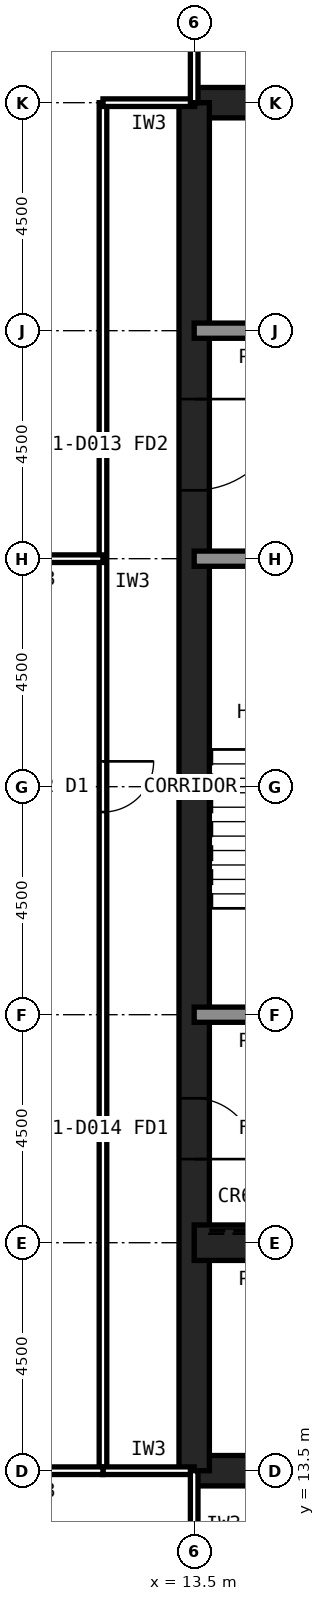
"""IFC4 building model, lengths in metres.
Left out: names, types, materials, properties, quantities, classifications, styles, units other than length and angle.
Written with IfcOpenShell. Run it as: python <this file> out.ifc"""

import sys

from ifc_helpers import new_model, si_unit, direction, frame, frame_2d, origin, place, context, subcontext, project, spatial, rectangle, extrude, element, fill, save


model = new_model("IFC4")
c1 = context("Model", 3, precision=1e-05, world=origin(), true_north=direction((0.0, 1.0)))
c2 = subcontext(c1, "Body", "Model", "MODEL_VIEW")
j1 = project(units=[si_unit("LENGTHUNIT", "METRE"), si_unit("PLANEANGLEUNIT", "RADIAN")], contexts=[c1])
p1 = place(None, origin())
s1 = spatial("IfcSite", under=j1, at=p1, CompositionType="ELEMENT")
p2 = place(p1, origin())
s2 = spatial("IfcBuilding", under=s1, at=p2, CompositionType="ELEMENT")
p3 = place(p2, frame((0.0, 0.0, 87.8)))
s3 = spatial("IfcBuildingStorey", under=s2, at=p3, CompositionType="ELEMENT", Elevation=87.8)
for number, where, z_axis, x_axis in (
    (1, (13.5, 13.5, 0.0), (0.0, 0.0, 1.0), (1.0, 0.0, 0.0)),
    (2, (40.5, 40.5, 0.0), (0.0, 0.0, 1.0), (-1.0, 0.0, 0.0)),
):
    element("IfcWall", number, at=place(p3, frame(where, z_axis=z_axis, x_axis=x_axis)), inside=s3, PredefinedType="SHEAR", context=c2, shape_type="SweptSolid", body=[
        extrude(rectangle(XDim=27.0, YDim=0.6, at=frame_2d((13.5, 0.0))), origin(), (0.0, 0.0, 1.0), 4.2),
    ])
p4 = place(p3, frame((13.5, 40.5, 0.0), z_axis=(0.0, 0.0, 1.0), x_axis=(0.0, -1.0, 0.0)))
e3 = element("IfcWall", 3, at=p4, inside=s3, PredefinedType="SHEAR", context=c2, shape_type="SweptSolid", body=[
    extrude(rectangle(XDim=27.0, YDim=0.6, at=frame_2d((13.5, 0.0))), origin(), (0.0, 0.0, 1.0), 4.2),
])
p5 = place(p4, frame((19.65, 0.0, 0.0)))
e4 = element("IfcOpeningElement", 4, at=p5, cuts=e3, PredefinedType="OPENING", context=c2, shape_type="SweptSolid", body=[
    extrude(rectangle(XDim=1.2, YDim=2.1, at=frame_2d((0.6, 1.05))), frame((0.0, 0.31, 0.0), z_axis=(0.0, -1.0, 0.0), x_axis=(1.0, 0.0, 0.0)), (0.0, 0.0, 1.0), 0.62),
])
p6 = place(p4, frame((5.85, 0.0, 0.0)))
e5 = element("IfcOpeningElement", 5, at=p6, cuts=e3, PredefinedType="OPENING", context=c2, shape_type="SweptSolid", body=[
    extrude(rectangle(XDim=1.8, YDim=2.1, at=frame_2d((0.9, 1.05))), frame((0.0, 0.31, 0.0), z_axis=(0.0, -1.0, 0.0), x_axis=(1.0, 0.0, 0.0)), (0.0, 0.0, 1.0), 0.62),
])
p7 = place(p3, frame((13.5, 18.0, 0.0), z_axis=(0.0, 0.0, 1.0), x_axis=(1.0, 0.0, 0.0)))
e6 = element("IfcWall", 6, at=p7, inside=s3, PredefinedType="SHEAR", context=c2, shape_type="SweptSolid", body=[
    extrude(rectangle(XDim=27.0, YDim=0.7, at=frame_2d((13.5, 0.0))), origin(), (0.0, 0.0, 1.0), 4.2),
])
p8 = place(p7, frame((24.3, 0.0, 0.0)))
e7 = element("IfcOpeningElement", 7, at=p8, cuts=e6, PredefinedType="OPENING", context=c2, shape_type="SweptSolid", body=[
    extrude(rectangle(XDim=0.9, YDim=2.1, at=frame_2d((0.45, 1.05))), frame((0.0, 0.36, 0.0), z_axis=(0.0, -1.0, 0.0), x_axis=(1.0, 0.0, 0.0)), (0.0, 0.0, 1.0), 0.72),
])
p9 = place(p7, frame((5.45, 0.0, 0.0)))
e8 = element("IfcOpeningElement", 8, at=p9, cuts=e6, PredefinedType="OPENING", context=c2, shape_type="SweptSolid", body=[
    extrude(rectangle(XDim=1.1, YDim=2.1, at=frame_2d((0.55, 1.05))), frame((0.0, 0.36, 0.0), z_axis=(0.0, -1.0, 0.0), x_axis=(1.0, 0.0, 0.0)), (0.0, 0.0, 1.0), 0.72),
])
p10 = place(p7, frame((8.45, 0.0, 0.0)))
e9 = element("IfcOpeningElement", 9, at=p10, cuts=e6, PredefinedType="OPENING", context=c2, shape_type="SweptSolid", body=[
    extrude(rectangle(XDim=1.1, YDim=2.1, at=frame_2d((0.55, 1.05))), frame((0.0, 0.36, 0.0), z_axis=(0.0, -1.0, 0.0), x_axis=(1.0, 0.0, 0.0)), (0.0, 0.0, 1.0), 0.72),
])
p11 = place(p7, frame((11.45, 0.0, 0.0)))
e10 = element("IfcOpeningElement", 10, at=p11, cuts=e6, PredefinedType="OPENING", context=c2, shape_type="SweptSolid", body=[
    extrude(rectangle(XDim=1.1, YDim=2.1, at=frame_2d((0.55, 1.05))), frame((0.0, 0.36, 0.0), z_axis=(0.0, -1.0, 0.0), x_axis=(1.0, 0.0, 0.0)), (0.0, 0.0, 1.0), 0.72),
])
p12 = place(p7, frame((14.45, 0.0, 0.0)))
e11 = element("IfcOpeningElement", 11, at=p12, cuts=e6, PredefinedType="OPENING", context=c2, shape_type="SweptSolid", body=[
    extrude(rectangle(XDim=1.1, YDim=2.1, at=frame_2d((0.55, 1.05))), frame((0.0, 0.36, 0.0), z_axis=(0.0, -1.0, 0.0), x_axis=(1.0, 0.0, 0.0)), (0.0, 0.0, 1.0), 0.72),
])
p13 = place(p7, frame((17.45, 0.0, 0.0)))
e12 = element("IfcOpeningElement", 12, at=p13, cuts=e6, PredefinedType="OPENING", context=c2, shape_type="SweptSolid", body=[
    extrude(rectangle(XDim=1.1, YDim=2.1, at=frame_2d((0.55, 1.05))), frame((0.0, 0.36, 0.0), z_axis=(0.0, -1.0, 0.0), x_axis=(1.0, 0.0, 0.0)), (0.0, 0.0, 1.0), 0.72),
])
p14 = place(p7, frame((20.45, 0.0, 0.0)))
e13 = element("IfcOpeningElement", 13, at=p14, cuts=e6, PredefinedType="OPENING", context=c2, shape_type="SweptSolid", body=[
    extrude(rectangle(XDim=1.1, YDim=2.1, at=frame_2d((0.55, 1.05))), frame((0.0, 0.36, 0.0), z_axis=(0.0, -1.0, 0.0), x_axis=(1.0, 0.0, 0.0)), (0.0, 0.0, 1.0), 0.72),
])
p15 = place(p7, frame((1.6, 0.0, 0.0)))
e14 = element("IfcOpeningElement", 14, at=p15, cuts=e6, PredefinedType="OPENING", context=c2, shape_type="SweptSolid", body=[
    extrude(rectangle(XDim=1.3, YDim=2.2, at=frame_2d((0.65, 1.1))), frame((0.0, 0.36, 0.0), z_axis=(0.0, -1.0, 0.0), x_axis=(1.0, 0.0, 0.0)), (0.0, 0.0, 1.0), 0.72),
])
p16 = place(p3, frame((13.5, 36.0, 0.0), z_axis=(0.0, 0.0, 1.0), x_axis=(1.0, 0.0, 0.0)))
e15 = element("IfcWall", 15, at=p16, inside=s3, PredefinedType="SOLIDWALL", context=c2, shape_type="SweptSolid", body=[
    extrude(rectangle(XDim=27.0, YDim=0.3, at=frame_2d((13.5, 0.0))), origin(), (0.0, 0.0, 1.0), 4.04),
])
p17 = place(p16, frame((1.8, 0.0, 0.0)))
e16 = element("IfcOpeningElement", 16, at=p17, cuts=e15, PredefinedType="OPENING", context=c2, shape_type="SweptSolid", body=[
    extrude(rectangle(XDim=0.9, YDim=2.1, at=frame_2d((0.45, 1.05))), frame((0.0, 0.16, 0.0), z_axis=(0.0, -1.0, 0.0), x_axis=(1.0, 0.0, 0.0)), (0.0, 0.0, 1.0), 0.32),
])
p18 = place(p16, frame((24.1, 0.0, 0.0)))
e17 = element("IfcOpeningElement", 17, at=p18, cuts=e15, PredefinedType="OPENING", context=c2, shape_type="SweptSolid", body=[
    extrude(rectangle(XDim=1.3, YDim=2.2, at=frame_2d((0.65, 1.1))), frame((0.0, 0.16, 0.0), z_axis=(0.0, -1.0, 0.0), x_axis=(1.0, 0.0, 0.0)), (0.0, 0.0, 1.0), 0.32),
])
p19 = place(p3, frame((13.5, 22.5, 0.0), z_axis=(0.0, 0.0, 1.0), x_axis=(1.0, 0.0, 0.0)))
e18 = element("IfcWall", 18, at=p19, inside=s3, PredefinedType="SOLIDWALL", context=c2, shape_type="SweptSolid", body=[
    extrude(rectangle(XDim=27.0, YDim=0.3, at=frame_2d((13.5, 0.0))), origin(), (0.0, 0.0, 1.0), 4.04),
])
p20 = place(p19, frame((1.65, 0.0, 0.0)))
e19 = element("IfcOpeningElement", 19, at=p20, cuts=e18, PredefinedType="OPENING", context=c2, shape_type="SweptSolid", body=[
    extrude(rectangle(XDim=1.2, YDim=2.1, at=frame_2d((0.6, 1.05))), frame((0.0, 0.16, 0.0), z_axis=(0.0, -1.0, 0.0), x_axis=(1.0, 0.0, 0.0)), (0.0, 0.0, 1.0), 0.32),
])
p21 = place(p19, frame((6.025, 0.0, 0.0)))
e20 = element("IfcOpeningElement", 20, at=p21, cuts=e18, PredefinedType="OPENING", context=c2, shape_type="SweptSolid", body=[
    extrude(rectangle(XDim=1.0, YDim=2.1, at=frame_2d((0.5, 1.05))), frame((0.0, 0.16, 0.0), z_axis=(0.0, -1.0, 0.0), x_axis=(1.0, 0.0, 0.0)), (0.0, 0.0, 1.0), 0.32),
])
p22 = place(p19, frame((10.525, 0.0, 0.0)))
e21 = element("IfcOpeningElement", 21, at=p22, cuts=e18, PredefinedType="OPENING", context=c2, shape_type="SweptSolid", body=[
    extrude(rectangle(XDim=1.0, YDim=2.1, at=frame_2d((0.5, 1.05))), frame((0.0, 0.16, 0.0), z_axis=(0.0, -1.0, 0.0), x_axis=(1.0, 0.0, 0.0)), (0.0, 0.0, 1.0), 0.32),
])
p23 = place(p19, frame((19.75, 0.0, 0.0)))
e22 = element("IfcOpeningElement", 22, at=p23, cuts=e18, PredefinedType="OPENING", context=c2, shape_type="SweptSolid", body=[
    extrude(rectangle(XDim=1.0, YDim=2.1, at=frame_2d((0.5, 1.05))), frame((0.0, 0.16, 0.0), z_axis=(0.0, -1.0, 0.0), x_axis=(1.0, 0.0, 0.0)), (0.0, 0.0, 1.0), 0.32),
])
p24 = place(p19, frame((15.05, 0.0, 0.0)))
e23 = element("IfcOpeningElement", 23, at=p24, cuts=e18, PredefinedType="OPENING", context=c2, shape_type="SweptSolid", body=[
    extrude(rectangle(XDim=1.4, YDim=2.4, at=frame_2d((0.7, 1.2))), frame((0.0, 0.16, 0.0), z_axis=(0.0, -1.0, 0.0), x_axis=(1.0, 0.0, 0.0)), (0.0, 0.0, 1.0), 0.32),
])
p25 = place(p3, frame((13.5, 31.5, 0.0), z_axis=(0.0, 0.0, 1.0), x_axis=(1.0, 0.0, 0.0)))
e24 = element("IfcWall", 24, at=p25, inside=s3, PredefinedType="SOLIDWALL", context=c2, shape_type="SweptSolid", body=[
    extrude(rectangle(XDim=27.0, YDim=0.3, at=frame_2d((13.5, 0.0))), origin(), (0.0, 0.0, 1.0), 4.04),
])
p26 = place(p25, frame((24.15, 0.0, 0.0)))
e25 = element("IfcOpeningElement", 25, at=p26, cuts=e24, PredefinedType="OPENING", context=c2, shape_type="SweptSolid", body=[
    extrude(rectangle(XDim=1.2, YDim=2.1, at=frame_2d((0.6, 1.05))), frame((0.0, 0.16, 0.0), z_axis=(0.0, -1.0, 0.0), x_axis=(1.0, 0.0, 0.0)), (0.0, 0.0, 1.0), 0.32),
])
p27 = place(p25, frame((15.3, 0.0, 0.0)))
e26 = element("IfcOpeningElement", 26, at=p27, cuts=e24, PredefinedType="OPENING", context=c2, shape_type="SweptSolid", body=[
    extrude(rectangle(XDim=0.9, YDim=2.1, at=frame_2d((0.45, 1.05))), frame((0.0, 0.16, 0.0), z_axis=(0.0, -1.0, 0.0), x_axis=(1.0, 0.0, 0.0)), (0.0, 0.0, 1.0), 0.32),
])
p28 = place(p25, frame((19.8, 0.0, 0.0)))
e27 = element("IfcOpeningElement", 27, at=p28, cuts=e24, PredefinedType="OPENING", context=c2, shape_type="SweptSolid", body=[
    extrude(rectangle(XDim=0.9, YDim=2.1, at=frame_2d((0.45, 1.05))), frame((0.0, 0.16, 0.0), z_axis=(0.0, -1.0, 0.0), x_axis=(1.0, 0.0, 0.0)), (0.0, 0.0, 1.0), 0.32),
])
p29 = place(p3, frame((11.7, 40.5, 0.0), z_axis=(0.0, 0.0, 1.0), x_axis=(0.0, -1.0, 0.0)))
e28 = element("IfcWall", 28, at=p29, inside=s3, PredefinedType="PARTITIONING", context=c2, shape_type="SweptSolid", body=[
    extrude(rectangle(XDim=27.0, YDim=0.15, at=frame_2d((13.5, 0.0))), origin(), (0.0, 0.0, 1.0), 4.04),
])
p30 = place(p29, frame((13.0, 0.0, 0.0)))
e29 = element("IfcOpeningElement", 29, at=p30, cuts=e28, PredefinedType="OPENING", context=c2, shape_type="SweptSolid", body=[
    extrude(rectangle(XDim=1.0, YDim=2.1, at=frame_2d((0.5, 1.05))), frame((0.0, 0.085, 0.0), z_axis=(0.0, -1.0, 0.0), x_axis=(1.0, 0.0, 0.0)), (0.0, 0.0, 1.0), 0.17),
])
p31 = place(p3, frame((13.51, 40.5, 0.0), z_axis=(0.0, 0.0, 1.0), x_axis=(-1.0, 0.0, 0.0)))
e30 = element("IfcWall", 30, at=p31, inside=s3, PredefinedType="PARTITIONING", context=c2, shape_type="SweptSolid", body=[
    extrude(rectangle(XDim=1.81, YDim=0.15, at=frame_2d((0.905, 0.0))), origin(), (0.0, 0.0, 1.0), 3.189),
])
p32 = place(p3, frame((11.7, 13.5, 0.0), z_axis=(0.0, 0.0, 1.0), x_axis=(1.0, 0.0, 0.0)))
e31 = element("IfcWall", 31, at=p32, inside=s3, PredefinedType="PARTITIONING", context=c2, shape_type="SweptSolid", body=[
    extrude(rectangle(XDim=1.8, YDim=0.15, at=frame_2d((0.9, 0.0))), origin(), (0.0, 0.0, 1.0), 3.189),
])
p33 = place(p3, frame((13.5, 13.5, 0.0), z_axis=(0.0, 0.0, 1.0), x_axis=(0.0, -1.0, 0.0)))
e32 = element("IfcWall", 32, at=p33, inside=s3, PredefinedType="PARTITIONING", context=c2, shape_type="SweptSolid", body=[
    extrude(rectangle(XDim=5.4, YDim=0.15, at=frame_2d((2.7, 0.0))), origin(), (0.0, 0.0, 1.0), 3.189),
])
p34 = place(p33, frame((2.2, 0.0, 0.0)))
e33 = element("IfcOpeningElement", 33, at=p34, cuts=e32, PredefinedType="OPENING", context=c2, shape_type="SweptSolid", body=[
    extrude(rectangle(XDim=1.0, YDim=2.1, at=frame_2d((0.5, 1.05))), frame((0.0, 0.085, 0.0), z_axis=(0.0, -1.0, 0.0), x_axis=(1.0, 0.0, 0.0)), (0.0, 0.0, 1.0), 0.17),
])
p35 = place(p3, frame((13.5, 40.5, 0.0), z_axis=(0.0, 0.0, 1.0), x_axis=(0.0, 1.0, 0.0)))
e34 = element("IfcWall", 34, at=p35, inside=s3, PredefinedType="PARTITIONING", context=c2, shape_type="SweptSolid", body=[
    extrude(rectangle(XDim=13.055, YDim=0.15, at=frame_2d((6.527, 0.0))), origin(), (0.0, 0.0, 1.0), 3.189),
])
p36 = place(p35, frame((6.028, 0.0, 0.0)))
e35 = element("IfcOpeningElement", 35, at=p36, cuts=e34, PredefinedType="OPENING", context=c2, shape_type="SweptSolid", body=[
    extrude(rectangle(XDim=1.0, YDim=2.1, at=frame_2d((0.5, 1.05))), frame((0.0, 0.085, 0.0), z_axis=(0.0, -1.0, 0.0), x_axis=(1.0, 0.0, 0.0)), (0.0, 0.0, 1.0), 0.17),
])
p37 = place(p3, frame((11.7, 31.5, 0.0), z_axis=(0.0, 0.0, 1.0), x_axis=(-1.0, 0.0, 0.0)))
e36 = element("IfcWall", 36, at=p37, inside=s3, PredefinedType="PARTITIONING", context=c2, shape_type="SweptSolid", body=[
    extrude(rectangle(XDim=6.3, YDim=0.15, at=frame_2d((3.15, 0.0))), origin(), (0.0, 0.0, 1.0), 3.189),
])
p38 = place(p37, frame((2.65, 0.0, 0.0)))
e37 = element("IfcOpeningElement", 37, at=p38, cuts=e36, PredefinedType="OPENING", context=c2, shape_type="SweptSolid", body=[
    extrude(rectangle(XDim=1.0, YDim=2.1, at=frame_2d((0.5, 1.05))), frame((0.0, 0.085, 0.0), z_axis=(0.0, -1.0, 0.0), x_axis=(1.0, 0.0, 0.0)), (0.0, 0.0, 1.0), 0.17),
])
p39 = place(p3, frame((11.7, 13.5, 0.0), z_axis=(0.0, 0.0, 1.0), x_axis=(-1.0, 0.0, 0.0)))
e38 = element("IfcWall", 38, at=p39, inside=s3, PredefinedType="PARTITIONING", context=c2, shape_type="SweptSolid", body=[
    extrude(rectangle(XDim=6.3, YDim=0.15, at=frame_2d((3.15, 0.0))), origin(), (0.0, 0.0, 1.0), 3.189),
])
p40 = place(p39, frame((2.65, 0.0, 0.0)))
e39 = element("IfcOpeningElement", 39, at=p40, cuts=e38, PredefinedType="OPENING", context=c2, shape_type="SweptSolid", body=[
    extrude(rectangle(XDim=1.0, YDim=2.1, at=frame_2d((0.5, 1.05))), frame((0.0, 0.085, 0.0), z_axis=(0.0, -1.0, 0.0), x_axis=(1.0, 0.0, 0.0)), (0.0, 0.0, 1.0), 0.17),
])
p41 = place(p5, origin())
e40 = element("IfcDoor", 40, at=p41, inside=s3, OperationType="SINGLE_SWING_RIGHT", PredefinedType="DOOR", context=c2, shape_type="SweptSolid", body=[
    extrude(rectangle(XDim=1.2, YDim=2.1, at=frame_2d((0.6, 1.05))), frame((0.0, 0.025, 0.0), z_axis=(0.0, -1.0, 0.0), x_axis=(1.0, 0.0, 0.0)), (0.0, 0.0, 1.0), 0.05),
])
fill(e4, e40)
p42 = place(p6, origin())
e41 = element("IfcDoor", 41, at=p42, inside=s3, OperationType="SINGLE_SWING_LEFT", PredefinedType="DOOR", context=c2, shape_type="SweptSolid", body=[
    extrude(rectangle(XDim=1.8, YDim=2.1, at=frame_2d((0.9, 1.05))), frame((0.0, 0.025, 0.0), z_axis=(0.0, -1.0, 0.0), x_axis=(1.0, 0.0, 0.0)), (0.0, 0.0, 1.0), 0.05),
])
fill(e5, e41)
p43 = place(p30, origin())
e42 = element("IfcDoor", 42, at=p43, inside=s3, OperationType="SINGLE_SWING_LEFT", PredefinedType="DOOR", context=c2, shape_type="SweptSolid", body=[
    extrude(rectangle(XDim=1.0, YDim=2.1, at=frame_2d((0.5, 1.05))), frame((0.0, 0.025, 0.0), z_axis=(0.0, -1.0, 0.0), x_axis=(1.0, 0.0, 0.0)), (0.0, 0.0, 1.0), 0.05),
])
fill(e29, e42)
save(model, sys.argv[1])
